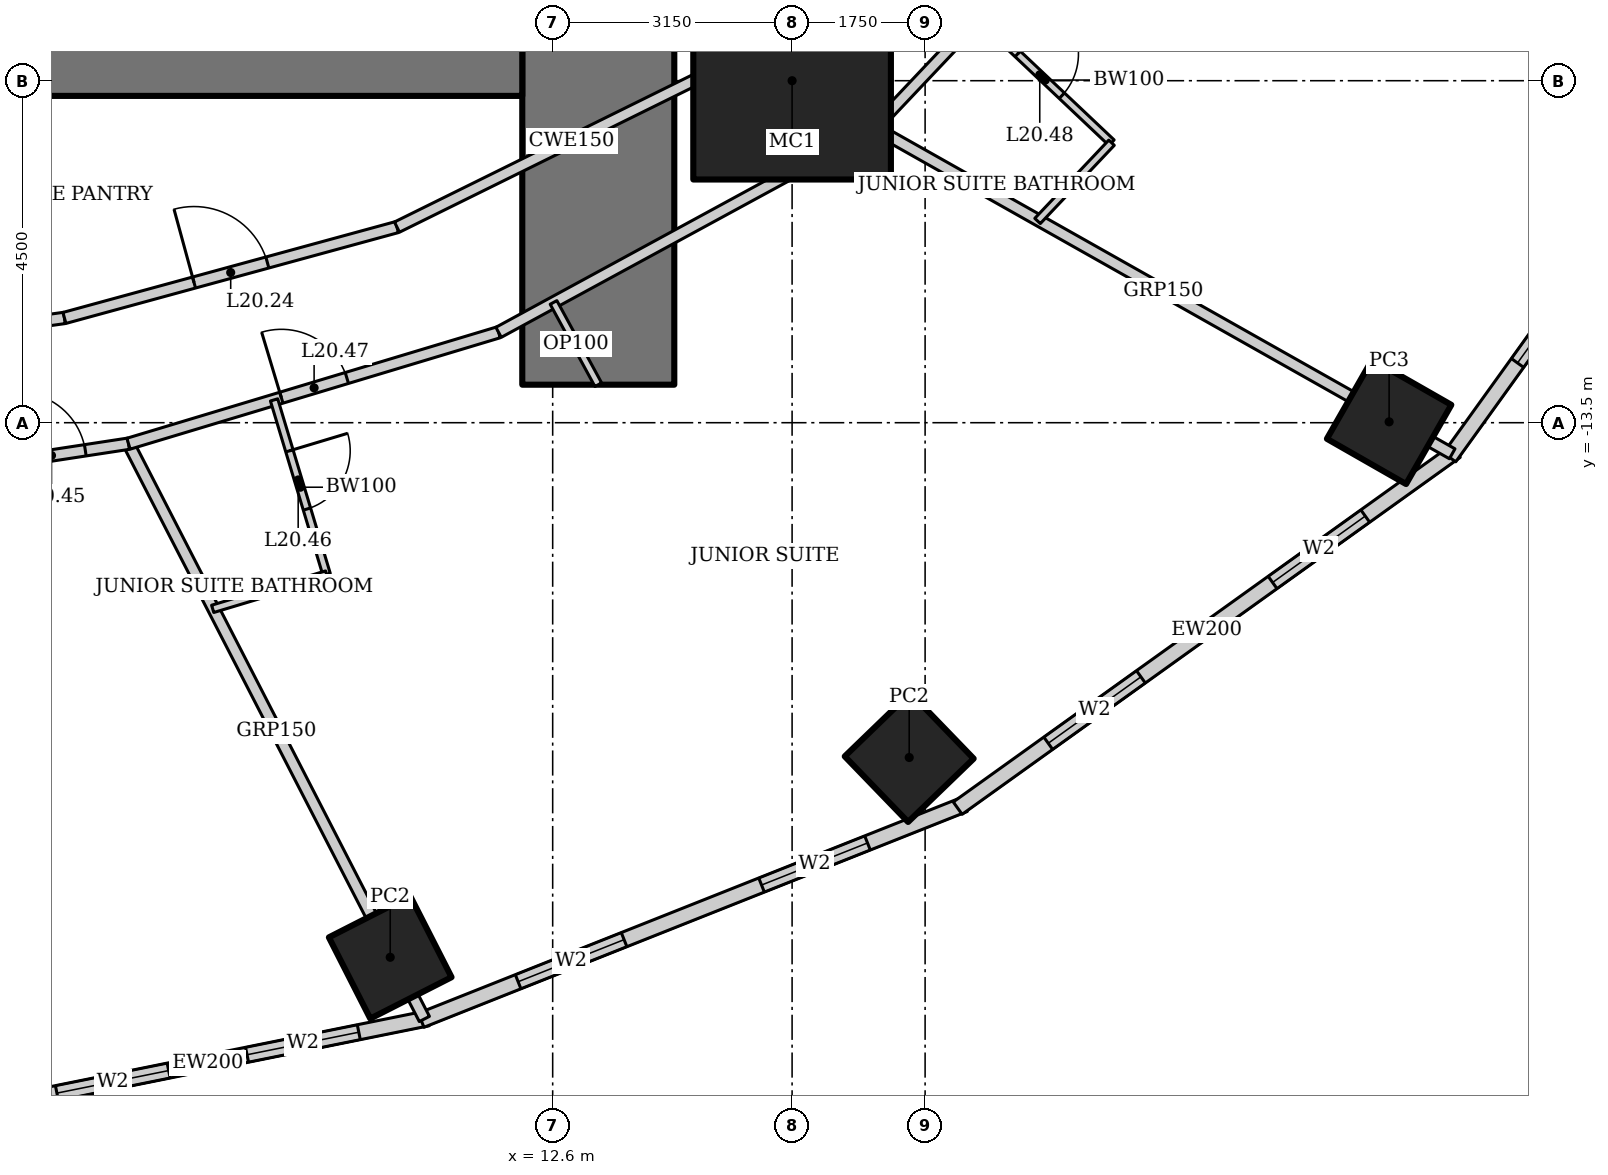
"""IFC4 building model, lengths in metres.
Left out: names, types, materials, properties, quantities, classifications, styles, units other than length and angle.
Written with IfcOpenShell. Run it as: python <this file> out.ifc"""

import sys

from ifc_helpers import new_model, si_unit, direction, frame, frame_2d, origin, origin_2d, place, context, subcontext, project, spatial, rectangle, hollow_rectangle, extrude, element, fill, save


model = new_model("IFC4")
c1 = context("Model", 3, precision=1e-05, world=origin(), true_north=direction((0.0, 1.0)))
c2 = subcontext(c1, "Body", "Model", "MODEL_VIEW")
j1 = project(units=[si_unit("LENGTHUNIT", "METRE"), si_unit("PLANEANGLEUNIT", "RADIAN")], contexts=[c1])
p1 = place(None, origin())
s1 = spatial("IfcSite", under=j1, at=p1, CompositionType="ELEMENT")
p2 = place(p1, origin())
s2 = spatial("IfcBuilding", under=s1, at=p2, CompositionType="ELEMENT")
p3 = place(p2, frame((0.0, 0.0, 87.4)))
s3 = spatial("IfcBuildingStorey", under=s2, at=p3, CompositionType="ELEMENT", Elevation=87.4)
p4 = place(p3, frame((15.75, -9.0, 0.0), z_axis=(0.0, 0.0, 1.0), x_axis=(1.0, 0.0, 0.0)))
e1 = element("IfcColumn", 1, at=p4, inside=s3, PredefinedType="COLUMN", context=c2, shape_type="SweptSolid", body=[
    extrude(hollow_rectangle(XDim=2.6, YDim=2.6, WallThickness=0.13, at=origin_2d()), origin(), (0.0, 0.0, 1.0), 3.6),
])
for number, where, z_axis, x_axis in (
    (2, (10.463, -20.534, 0.0), (0.0, 0.0, 1.0), (0.891, 0.454, 0.0)),
    (3, (17.291, -17.905, 0.0), (0.0, 0.0, 1.0), (0.719, 0.695, 0.0)),
):
    element("IfcColumn", number, at=place(p3, frame(where, z_axis=z_axis, x_axis=x_axis)), inside=s3, PredefinedType="COLUMN", context=c2, shape_type="SweptSolid", body=[
        extrude(hollow_rectangle(XDim=1.2, YDim=1.2, WallThickness=0.1, at=origin_2d()), origin(), (0.0, 0.0, 1.0), 3.6),
    ])
p5 = place(p3, frame((23.605, -13.489, 0.0), z_axis=(0.0, 0.0, 1.0), x_axis=(0.496139221777, 0.86824298017, 0.0)))
e4 = element("IfcColumn", 4, at=p5, inside=s3, PredefinedType="COLUMN", context=c2, shape_type="SweptSolid", body=[
    extrude(hollow_rectangle(XDim=1.2, YDim=1.2, WallThickness=0.12, at=origin_2d()), origin(), (0.0, 0.0, 1.0), 3.6),
])
p6 = place(p3, frame((13.2, -13.0, 0.0), z_axis=(0.0, 0.0, 1.0), x_axis=(0.0, 1.0, 0.0)))
e5 = element("IfcWall", 5, at=p6, inside=s3, PredefinedType="SHEAR", context=c2, shape_type="SweptSolid", body=[
    extrude(rectangle(XDim=26.0, YDim=2.0, at=frame_2d((13.0, 0.0))), origin(), (0.0, 0.0, 1.0), 3.6),
])
p7 = place(p6, frame((12.1, 0.0, 0.0)))
e6 = element("IfcOpeningElement", 6, at=p7, cuts=e5, PredefinedType="OPENING", context=c2, shape_type="SweptSolid", body=[
    extrude(rectangle(XDim=1.8, YDim=2.1, at=frame_2d((0.9, 1.05))), frame((0.0, 1.01, 0.0), z_axis=(0.0, -1.0, 0.0), x_axis=(1.0, 0.0, 0.0)), (0.0, 0.0, 1.0), 2.02),
])
p8 = place(p3, frame((-12.2, -8.0, 0.0), z_axis=(0.0, 0.0, 1.0), x_axis=(1.0, 0.0, 0.0)))
e7 = element("IfcWall", 7, at=p8, inside=s3, PredefinedType="SHEAR", context=c2, shape_type="SweptSolid", body=[
    extrude(rectangle(XDim=24.4, YDim=2.4, at=frame_2d((12.2, 0.0))), origin(), (0.0, 0.0, 1.0), 3.6),
])
p9 = place(p3, frame((5.17, -22.504, 0.0), z_axis=(0.0, 0.0, 1.0), x_axis=(0.980251657452, 0.197754110105, 0.0)))
e8 = element("IfcWall", 8, at=p9, inside=s3, PredefinedType="SOLIDWALL", context=c2, shape_type="SweptSolid", body=[
    extrude(rectangle(XDim=5.904, YDim=0.2, at=frame_2d((2.952, 0.0))), origin(), (0.0, 0.0, 1.0), 3.45),
])
p10 = place(p9, frame((0.926, 0.0, 0.5)))
e9 = element("IfcOpeningElement", 9, at=p10, cuts=e8, PredefinedType="OPENING", context=c2, shape_type="SweptSolid", body=[
    extrude(rectangle(XDim=1.5, YDim=2.2, at=frame_2d((0.75, 1.1))), frame((0.0, 0.11, 0.0), z_axis=(0.0, -1.0, 0.0), x_axis=(1.0, 0.0, 0.0)), (0.0, 0.0, 1.0), 0.22),
])
p11 = place(p9, frame((3.478, 0.0, 0.5)))
e10 = element("IfcOpeningElement", 10, at=p11, cuts=e8, PredefinedType="OPENING", context=c2, shape_type="SweptSolid", body=[
    extrude(rectangle(XDim=1.5, YDim=2.2, at=frame_2d((0.75, 1.1))), frame((0.0, 0.11, 0.0), z_axis=(0.0, -1.0, 0.0), x_axis=(1.0, 0.0, 0.0)), (0.0, 0.0, 1.0), 0.22),
])
p12 = place(p3, frame((10.869, -21.363, 0.0), z_axis=(0.0, 0.0, 1.0), x_axis=(0.929358351251, 0.369178892895, 0.0)))
e11 = element("IfcWall", 11, at=p12, inside=s3, PredefinedType="SOLIDWALL", context=c2, shape_type="SweptSolid", body=[
    extrude(rectangle(XDim=7.692, YDim=0.2, at=frame_2d((3.846, 0.0))), origin(), (0.0, 0.0, 1.0), 3.45),
])
p13 = place(p12, frame((1.373, 0.0, 0.5)))
e12 = element("IfcOpeningElement", 12, at=p13, cuts=e11, PredefinedType="OPENING", context=c2, shape_type="SweptSolid", body=[
    extrude(rectangle(XDim=1.5, YDim=2.2, at=frame_2d((0.75, 1.1))), frame((0.0, 0.11, 0.0), z_axis=(0.0, -1.0, 0.0), x_axis=(1.0, 0.0, 0.0)), (0.0, 0.0, 1.0), 0.22),
])
p14 = place(p12, frame((4.819, 0.0, 0.5)))
e13 = element("IfcOpeningElement", 13, at=p14, cuts=e11, PredefinedType="OPENING", context=c2, shape_type="SweptSolid", body=[
    extrude(rectangle(XDim=1.5, YDim=2.2, at=frame_2d((0.75, 1.1))), frame((0.0, 0.11, 0.0), z_axis=(0.0, -1.0, 0.0), x_axis=(1.0, 0.0, 0.0)), (0.0, 0.0, 1.0), 0.22),
])
p15 = place(p3, frame((17.929, -18.572, 0.0), z_axis=(0.0, 0.0, 1.0), x_axis=(0.812791321576, 0.582554948112, 0.0)))
e14 = element("IfcWall", 14, at=p15, inside=s3, PredefinedType="SOLIDWALL", context=c2, shape_type="SweptSolid", body=[
    extrude(rectangle(XDim=8.063, YDim=0.2, at=frame_2d((4.032, 0.0))), origin(), (0.0, 0.0, 1.0), 3.45),
])
p16 = place(p15, frame((1.466, 0.0, 0.5)))
e15 = element("IfcOpeningElement", 15, at=p16, cuts=e14, PredefinedType="OPENING", context=c2, shape_type="SweptSolid", body=[
    extrude(rectangle(XDim=1.5, YDim=2.2, at=frame_2d((0.75, 1.1))), frame((0.0, 0.11, 0.0), z_axis=(0.0, -1.0, 0.0), x_axis=(1.0, 0.0, 0.0)), (0.0, 0.0, 1.0), 0.22),
])
p17 = place(p15, frame((5.097, 0.0, 0.5)))
e16 = element("IfcOpeningElement", 16, at=p17, cuts=e14, PredefinedType="OPENING", context=c2, shape_type="SweptSolid", body=[
    extrude(rectangle(XDim=1.5, YDim=2.2, at=frame_2d((0.75, 1.1))), frame((0.0, 0.11, 0.0), z_axis=(0.0, -1.0, 0.0), x_axis=(1.0, 0.0, 0.0)), (0.0, 0.0, 1.0), 0.22),
])
p18 = place(p3, frame((24.4, -13.957, 0.0), z_axis=(0.0, 0.0, 1.0), x_axis=(0.583937613703, 0.811798536155, 0.0)))
e17 = element("IfcWall", 17, at=p18, inside=s3, PredefinedType="SOLIDWALL", context=c2, shape_type="SweptSolid", body=[
    extrude(rectangle(XDim=8.323, YDim=0.2, at=frame_2d((4.162, 0.0))), origin(), (0.0, 0.0, 1.0), 3.45),
])
p19 = place(p18, frame((1.531, 0.0, 0.5)))
e18 = element("IfcOpeningElement", 18, at=p19, cuts=e17, PredefinedType="OPENING", context=c2, shape_type="SweptSolid", body=[
    extrude(rectangle(XDim=1.5, YDim=2.2, at=frame_2d((0.75, 1.1))), frame((0.0, 0.11, 0.0), z_axis=(0.0, -1.0, 0.0), x_axis=(1.0, 0.0, 0.0)), (0.0, 0.0, 1.0), 0.22),
])
p20 = place(p18, frame((5.292, 0.0, 0.5)))
e19 = element("IfcOpeningElement", 19, at=p20, cuts=e17, PredefinedType="OPENING", context=c2, shape_type="SweptSolid", body=[
    extrude(rectangle(XDim=1.5, YDim=2.2, at=frame_2d((0.75, 1.1))), frame((0.0, 0.11, 0.0), z_axis=(0.0, -1.0, 0.0), x_axis=(1.0, 0.0, 0.0)), (0.0, 0.0, 1.0), 0.22),
])
p21 = place(p3, frame((10.912, -21.346, 0.0), z_axis=(0.0, 0.0, 1.0), x_axis=(-0.457327273085, 0.889298468059, 0.0)))
e20 = element("IfcWall", 20, at=p21, inside=s3, PredefinedType="PARTITIONING", context=c2, shape_type="SweptSolid", body=[
    extrude(rectangle(XDim=8.511, YDim=0.15, at=frame_2d((4.256, 0.0))), origin(), (0.0, 0.0, 1.0), 2.528),
])
p22 = place(p3, frame((24.435, -13.909, 0.0), z_axis=(0.0, 0.0, 1.0), x_axis=(-0.87090601027, 0.491449612143, 0.0)))
e21 = element("IfcWall", 21, at=p22, inside=s3, PredefinedType="PARTITIONING", context=c2, shape_type="SweptSolid", body=[
    extrude(rectangle(XDim=8.726, YDim=0.15, at=frame_2d((4.363, 0.0))), origin(), (0.0, 0.0, 1.0), 2.693),
])
p23 = place(p3, frame((3.311, -14.342, 0.0), z_axis=(0.0, 0.0, 1.0), x_axis=(0.988564270062, 0.150800145746, 0.0)))
e22 = element("IfcWall", 22, at=p23, inside=s3, PredefinedType="PARTITIONING", context=c2, shape_type="SweptSolid", body=[
    extrude(rectangle(XDim=3.751, YDim=0.15, at=frame_2d((1.875, 0.0))), origin(), (0.0, 0.0, 1.0), 3.45),
])
p24 = place(p23, frame((2.276, 0.0, 0.0)))
e23 = element("IfcOpeningElement", 23, at=p24, cuts=e22, PredefinedType="OPENING", context=c2, shape_type="SweptSolid", body=[
    extrude(rectangle(XDim=0.9, YDim=2.1, at=frame_2d((0.45, 1.05))), frame((0.0, 0.085, 0.0), z_axis=(0.0, -1.0, 0.0), x_axis=(1.0, 0.0, 0.0)), (0.0, 0.0, 1.0), 0.17),
])
p25 = place(p3, frame((7.019, -13.776, 0.0), z_axis=(0.0, 0.0, 1.0), x_axis=(0.957564241242, 0.288219922793, 0.0)))
e24 = element("IfcWall", 24, at=p25, inside=s3, PredefinedType="PARTITIONING", context=c2, shape_type="SweptSolid", body=[
    extrude(rectangle(XDim=5.085, YDim=0.15, at=frame_2d((2.542, 0.0))), origin(), (0.0, 0.0, 1.0), 3.45),
])
p26 = place(p25, frame((2.1, 0.0, 0.0)))
e25 = element("IfcOpeningElement", 25, at=p26, cuts=e24, PredefinedType="OPENING", context=c2, shape_type="SweptSolid", body=[
    extrude(rectangle(XDim=0.9, YDim=2.1, at=frame_2d((0.45, 1.05))), frame((0.0, 0.085, 0.0), z_axis=(0.0, -1.0, 0.0), x_axis=(1.0, 0.0, 0.0)), (0.0, 0.0, 1.0), 0.17),
])
p27 = place(p3, frame((11.888, -12.311, 0.0), z_axis=(0.0, 0.0, 1.0), x_axis=(0.878450059298, 0.477834169267, 0.0)))
e26 = element("IfcWall", 26, at=p27, inside=s3, PredefinedType="PARTITIONING", context=c2, shape_type="SweptSolid", body=[
    extrude(rectangle(XDim=5.631, YDim=0.15, at=frame_2d((2.815, 0.0))), origin(), (0.0, 0.0, 1.0), 3.45),
])
p28 = place(p3, frame((16.835, -9.62, 0.0), z_axis=(0.0, 0.0, 1.0), x_axis=(0.687062608696, 0.726598218916, 0.0)))
e27 = element("IfcWall", 27, at=p28, inside=s3, PredefinedType="PARTITIONING", context=c2, shape_type="SweptSolid", body=[
    extrude(rectangle(XDim=6.039, YDim=0.15, at=frame_2d((3.02, 0.0))), origin(), (0.0, 0.0, 1.0), 3.45),
])
p29 = place(p3, frame((2.903, -12.574, 0.0), z_axis=(0.0, 0.0, 1.0), x_axis=(0.990563451353, 0.137054911782, 0.0)))
e28 = element("IfcWall", 28, at=p29, inside=s3, PredefinedType="PARTITIONING", context=c2, shape_type="SweptSolid", body=[
    extrude(rectangle(XDim=3.304, YDim=0.15, at=frame_2d((1.652, 0.0))), origin(), (0.0, 0.0, 1.0), 3.45),
])
p30 = place(p3, frame((6.176, -12.122, 0.0), z_axis=(0.0, 0.0, 1.0), x_axis=(0.964644466646, 0.263554648923, 0.0)))
e29 = element("IfcWall", 29, at=p30, inside=s3, PredefinedType="PARTITIONING", context=c2, shape_type="SweptSolid", body=[
    extrude(rectangle(XDim=4.535, YDim=0.15, at=frame_2d((2.268, 0.0))), origin(), (0.0, 0.0, 1.0), 3.45),
])
p31 = place(p30, frame((1.768, 0.0, 0.0)))
e30 = element("IfcOpeningElement", 30, at=p31, cuts=e29, PredefinedType="OPENING", context=c2, shape_type="SweptSolid", body=[
    extrude(rectangle(XDim=1.0, YDim=2.1, at=frame_2d((0.5, 1.05))), frame((0.0, 0.085, 0.0), z_axis=(0.0, -1.0, 0.0), x_axis=(1.0, 0.0, 0.0)), (0.0, 0.0, 1.0), 0.17),
])
p32 = place(p3, frame((10.551, -10.926, 0.0), z_axis=(0.0, 0.0, 1.0), x_axis=(0.89656943448, 0.442903205177, 0.0)))
e31 = element("IfcWall", 31, at=p32, inside=s3, PredefinedType="PARTITIONING", context=c2, shape_type="SweptSolid", body=[
    extrude(rectangle(XDim=5.126, YDim=0.15, at=frame_2d((2.563, 0.0))), origin(), (0.0, 0.0, 1.0), 3.45),
])
p33 = place(p3, frame((15.147, -8.656, 0.0), z_axis=(0.0, 0.0, 1.0), x_axis=(0.720837261072, 0.693104352209, 0.0)))
e32 = element("IfcWall", 32, at=p33, inside=s3, PredefinedType="PARTITIONING", context=c2, shape_type="SweptSolid", body=[
    extrude(rectangle(XDim=5.59, YDim=0.15, at=frame_2d((2.795, 0.0))), origin(), (0.0, 0.0, 1.0), 3.45),
])
p34 = place(p33, frame((2.295, 0.0, 0.0)))
e33 = element("IfcOpeningElement", 33, at=p34, cuts=e32, PredefinedType="OPENING", context=c2, shape_type="SweptSolid", body=[
    extrude(rectangle(XDim=1.0, YDim=2.1, at=frame_2d((0.5, 1.05))), frame((0.0, 0.085, 0.0), z_axis=(0.0, -1.0, 0.0), x_axis=(1.0, 0.0, 0.0)), (0.0, 0.0, 1.0), 0.17),
])
p35 = place(p3, frame((8.935, -13.2, 0.0), z_axis=(0.0, 0.0, 1.0), x_axis=(0.288197066254, -0.957571120598, 0.0)))
e34 = element("IfcWall", 34, at=p35, inside=s3, PredefinedType="PARTITIONING", context=c2, shape_type="SweptSolid", body=[
    extrude(rectangle(XDim=2.4, YDim=0.1, at=frame_2d((1.2, 0.0))), origin(), (0.0, 0.0, 1.0), 3.45),
])
p36 = place(p35, frame((0.7, 0.0, 0.0)))
e35 = element("IfcOpeningElement", 35, at=p36, cuts=e34, PredefinedType="OPENING", context=c2, shape_type="SweptSolid", body=[
    extrude(rectangle(XDim=0.8, YDim=2.1, at=frame_2d((0.4, 1.05))), frame((0.0, 0.06, 0.0), z_axis=(0.0, -1.0, 0.0), x_axis=(1.0, 0.0, 0.0)), (0.0, 0.0, 1.0), 0.12),
])
p37 = place(p3, frame((9.626, -15.498, 0.0), z_axis=(0.0, 0.0, 1.0), x_axis=(-0.957551231109, -0.288263143328, 0.0)))
e36 = element("IfcWall", 36, at=p37, inside=s3, PredefinedType="PARTITIONING", context=c2, shape_type="SweptSolid", body=[
    extrude(rectangle(XDim=1.566, YDim=0.1, at=frame_2d((0.783, 0.0))), origin(), (0.0, 0.0, 1.0), 3.45),
])
p38 = place(p3, frame((18.209, -8.167, 0.0), z_axis=(0.0, 0.0, 1.0), x_axis=(0.726567238928, -0.687095369885, 0.0)))
e37 = element("IfcWall", 37, at=p38, inside=s3, PredefinedType="PARTITIONING", context=c2, shape_type="SweptSolid", body=[
    extrude(rectangle(XDim=2.4, YDim=0.1, at=frame_2d((1.2, 0.0))), origin(), (0.0, 0.0, 1.0), 3.45),
])
p39 = place(p38, frame((0.7, 0.0, 0.0)))
e38 = element("IfcOpeningElement", 38, at=p39, cuts=e37, PredefinedType="OPENING", context=c2, shape_type="SweptSolid", body=[
    extrude(rectangle(XDim=0.8, YDim=2.1, at=frame_2d((0.4, 1.05))), frame((0.0, 0.06, 0.0), z_axis=(0.0, -1.0, 0.0), x_axis=(1.0, 0.0, 0.0)), (0.0, 0.0, 1.0), 0.12),
])
p40 = place(p3, frame((19.953, -9.816, 0.0), z_axis=(0.0, 0.0, 1.0), x_axis=(-0.687017997787, -0.726640399866, 0.0)))
e39 = element("IfcWall", 39, at=p40, inside=s3, PredefinedType="PARTITIONING", context=c2, shape_type="SweptSolid", body=[
    extrude(rectangle(XDim=1.417, YDim=0.1, at=frame_2d((0.708, 0.0))), origin(), (0.0, 0.0, 1.0), 3.45),
])
p41 = place(p3, frame((13.2, -13.0, 0.0), z_axis=(0.0, 0.0, 1.0), x_axis=(-0.477852414256, 0.878440134665, 0.0)))
e40 = element("IfcWall", 40, at=p41, inside=s3, PredefinedType="PARTITIONING", context=c2, shape_type="SweptSolid", body=[
    extrude(rectangle(XDim=1.232, YDim=0.1, at=frame_2d((0.616, 0.0))), origin(), (0.0, 0.0, 1.0), 3.45),
])
p42 = place(p10, origin())
e41 = element("IfcWindow", 41, at=p42, inside=s3, PartitioningType="SINGLE_PANEL", PredefinedType="WINDOW", context=c2, shape_type="SweptSolid", body=[
    extrude(rectangle(XDim=1.5, YDim=2.2, at=frame_2d((0.75, 1.1))), frame((0.0, 0.03, 0.0), z_axis=(0.0, -1.0, 0.0), x_axis=(1.0, 0.0, 0.0)), (0.0, 0.0, 1.0), 0.06),
])
fill(e9, e41)
p43 = place(p11, origin())
e42 = element("IfcWindow", 42, at=p43, inside=s3, PartitioningType="SINGLE_PANEL", PredefinedType="WINDOW", context=c2, shape_type="SweptSolid", body=[
    extrude(rectangle(XDim=1.5, YDim=2.2, at=frame_2d((0.75, 1.1))), frame((0.0, 0.03, 0.0), z_axis=(0.0, -1.0, 0.0), x_axis=(1.0, 0.0, 0.0)), (0.0, 0.0, 1.0), 0.06),
])
fill(e10, e42)
p44 = place(p13, origin())
e43 = element("IfcWindow", 43, at=p44, inside=s3, PartitioningType="SINGLE_PANEL", PredefinedType="WINDOW", context=c2, shape_type="SweptSolid", body=[
    extrude(rectangle(XDim=1.5, YDim=2.2, at=frame_2d((0.75, 1.1))), frame((0.0, 0.03, 0.0), z_axis=(0.0, -1.0, 0.0), x_axis=(1.0, 0.0, 0.0)), (0.0, 0.0, 1.0), 0.06),
])
fill(e12, e43)
p45 = place(p14, origin())
e44 = element("IfcWindow", 44, at=p45, inside=s3, PartitioningType="SINGLE_PANEL", PredefinedType="WINDOW", context=c2, shape_type="SweptSolid", body=[
    extrude(rectangle(XDim=1.5, YDim=2.2, at=frame_2d((0.75, 1.1))), frame((0.0, 0.03, 0.0), z_axis=(0.0, -1.0, 0.0), x_axis=(1.0, 0.0, 0.0)), (0.0, 0.0, 1.0), 0.06),
])
fill(e13, e44)
p46 = place(p16, origin())
e45 = element("IfcWindow", 45, at=p46, inside=s3, PartitioningType="SINGLE_PANEL", PredefinedType="WINDOW", context=c2, shape_type="SweptSolid", body=[
    extrude(rectangle(XDim=1.5, YDim=2.2, at=frame_2d((0.75, 1.1))), frame((0.0, 0.03, 0.0), z_axis=(0.0, -1.0, 0.0), x_axis=(1.0, 0.0, 0.0)), (0.0, 0.0, 1.0), 0.06),
])
fill(e15, e45)
p47 = place(p17, origin())
e46 = element("IfcWindow", 46, at=p47, inside=s3, PartitioningType="SINGLE_PANEL", PredefinedType="WINDOW", context=c2, shape_type="SweptSolid", body=[
    extrude(rectangle(XDim=1.5, YDim=2.2, at=frame_2d((0.75, 1.1))), frame((0.0, 0.03, 0.0), z_axis=(0.0, -1.0, 0.0), x_axis=(1.0, 0.0, 0.0)), (0.0, 0.0, 1.0), 0.06),
])
fill(e16, e46)
p48 = place(p19, origin())
e47 = element("IfcWindow", 47, at=p48, inside=s3, PartitioningType="SINGLE_PANEL", PredefinedType="WINDOW", context=c2, shape_type="SweptSolid", body=[
    extrude(rectangle(XDim=1.5, YDim=2.2, at=frame_2d((0.75, 1.1))), frame((0.0, 0.03, 0.0), z_axis=(0.0, -1.0, 0.0), x_axis=(1.0, 0.0, 0.0)), (0.0, 0.0, 1.0), 0.06),
])
fill(e18, e47)
p49 = place(p31, origin())
e48 = element("IfcDoor", 48, at=p49, inside=s3, OperationType="SINGLE_SWING_LEFT", PredefinedType="DOOR", context=c2, shape_type="SweptSolid", body=[
    extrude(rectangle(XDim=1.0, YDim=2.1, at=frame_2d((0.5, 1.05))), frame((0.0, 0.025, 0.0), z_axis=(0.0, -1.0, 0.0), x_axis=(1.0, 0.0, 0.0)), (0.0, 0.0, 1.0), 0.05),
])
fill(e30, e48)
p50 = place(p24, origin())
e49 = element("IfcDoor", 49, at=p50, inside=s3, OperationType="SINGLE_SWING_LEFT", PredefinedType="DOOR", context=c2, shape_type="SweptSolid", body=[
    extrude(rectangle(XDim=0.9, YDim=2.1, at=frame_2d((0.45, 1.05))), frame((0.0, 0.025, 0.0), z_axis=(0.0, -1.0, 0.0), x_axis=(1.0, 0.0, 0.0)), (0.0, 0.0, 1.0), 0.05),
])
fill(e23, e49)
p51 = place(p36, origin())
e50 = element("IfcDoor", 50, at=p51, inside=s3, OperationType="SINGLE_SWING_LEFT", PredefinedType="DOOR", context=c2, shape_type="SweptSolid", body=[
    extrude(rectangle(XDim=0.8, YDim=2.1, at=frame_2d((0.4, 1.05))), frame((0.0, 0.025, 0.0), z_axis=(0.0, -1.0, 0.0), x_axis=(1.0, 0.0, 0.0)), (0.0, 0.0, 1.0), 0.05),
])
fill(e35, e50)
p52 = place(p26, origin())
e51 = element("IfcDoor", 51, at=p52, inside=s3, OperationType="SINGLE_SWING_LEFT", PredefinedType="DOOR", context=c2, shape_type="SweptSolid", body=[
    extrude(rectangle(XDim=0.9, YDim=2.1, at=frame_2d((0.45, 1.05))), frame((0.0, 0.025, 0.0), z_axis=(0.0, -1.0, 0.0), x_axis=(1.0, 0.0, 0.0)), (0.0, 0.0, 1.0), 0.05),
])
fill(e25, e51)
p53 = place(p39, origin())
e52 = element("IfcDoor", 52, at=p53, inside=s3, OperationType="SINGLE_SWING_LEFT", PredefinedType="DOOR", context=c2, shape_type="SweptSolid", body=[
    extrude(rectangle(XDim=0.8, YDim=2.1, at=frame_2d((0.4, 1.05))), frame((0.0, 0.025, 0.0), z_axis=(0.0, -1.0, 0.0), x_axis=(1.0, 0.0, 0.0)), (0.0, 0.0, 1.0), 0.05),
])
fill(e38, e52)
save(model, sys.argv[1])
